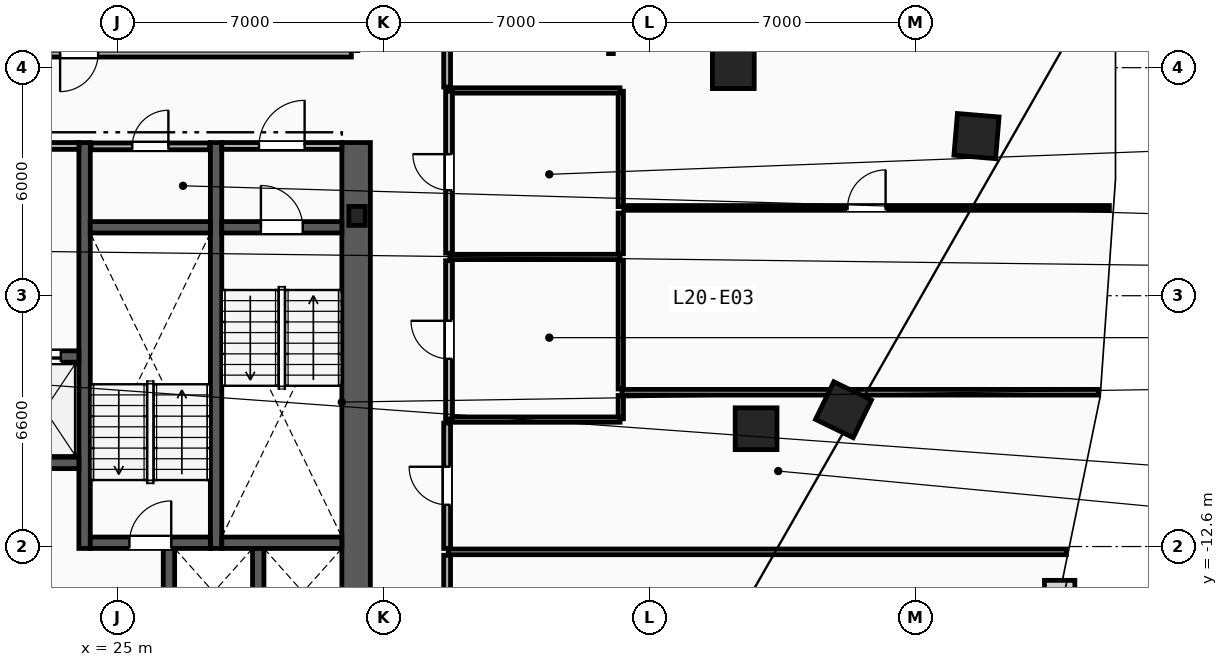
"""IFC4 building model, lengths in metres.
Left out: names, types, materials, properties, quantities, classifications, styles, units other than length and angle.
Written with IfcOpenShell. Run it as: python <this file> out.ifc"""

import sys

from ifc_helpers import new_model, si_unit, direction, frame, frame_2d, origin, origin_2d, place, context, subcontext, project, spatial, rectangle, i_section, extrude, element, fill, save


model = new_model("IFC4")
c1 = context("Model", 3, precision=1e-05, world=origin(), true_north=direction((0.0, 1.0)))
c2 = subcontext(c1, "Body", "Model", "MODEL_VIEW")
j1 = project(units=[si_unit("LENGTHUNIT", "METRE"), si_unit("PLANEANGLEUNIT", "RADIAN")], contexts=[c1])
p1 = place(None, origin())
s1 = spatial("IfcSite", under=j1, at=p1, CompositionType="ELEMENT")
p2 = place(p1, origin())
s2 = spatial("IfcBuilding", under=s1, at=p2, CompositionType="ELEMENT")
p3 = place(p2, frame((0.0, 0.0, 81.8)))
s3 = spatial("IfcBuildingStorey", under=s2, at=p3, CompositionType="ELEMENT", Elevation=81.8)
p4 = place(p3, frame((31.3, -3.9, 0.0), z_axis=(0.0, 0.0, 1.0), x_axis=(1.0, 0.0, 0.0)))
e1 = element("IfcColumn", 1, at=p4, inside=s3, PredefinedType="COLUMN", context=c2, shape_type="SweptSolid", body=[
    extrude(i_section(OverallWidth=0.432, OverallDepth=0.498, WebThickness=0.056, FlangeThickness=0.089, FilletRadius=0.018, at=origin_2d()), origin(), (0.0, 0.0, 1.0), 3.6),
])
for number, where, z_axis, x_axis in (
    (2, (41.2, 0.0, 0.0), (0.0, 0.0, 1.0), (1.0, 0.0, 0.0)),
    (3, (41.8, -9.5, 0.0), (0.0, 0.0, 1.0), (1.0, 0.0, 0.0)),
    (4, (44.1, -9.0, 0.0), (0.0, 0.0, 1.0), (0.437, 0.899, 0.0)),
    (5, (47.6, -1.8, 0.0), (0.0, 0.0, 1.0), (0.084, 0.997, 0.0)),
):
    element("IfcColumn", number, at=place(p3, frame(where, z_axis=z_axis, x_axis=x_axis)), inside=s3, PredefinedType="COLUMN", context=c2, shape_type="SweptSolid", body=[
        extrude(rectangle(XDim=1.1, YDim=1.1, at=origin_2d()), origin(), (0.0, 0.0, 1.0), 3.6),
    ])
p5 = place(p3, frame((31.275, -15.3, 0.0), z_axis=(0.0, 0.0, 1.0), x_axis=(0.0, 1.0, 0.0)))
e6 = element("IfcWall", 6, at=p5, inside=s3, PredefinedType="SHEAR", context=c2, shape_type="SweptSolid", body=[
    extrude(rectangle(XDim=13.33, YDim=0.75, at=frame_2d((6.665, 0.0))), origin(), (0.0, 0.0, 1.0), 3.3),
])
for number, where, z_axis, x_axis in (
    (7, (27.59, -12.65, 0.0), (0.0, 0.0, 1.0), (0.0, 1.0, 0.0)),
    (8, (24.13, -12.65, 0.0), (0.0, 0.0, 1.0), (0.0, 1.0, 0.0)),
):
    element("IfcWall", number, at=place(p3, frame(where, z_axis=z_axis, x_axis=x_axis)), inside=s3, PredefinedType="SHEAR", context=c2, shape_type="SweptSolid", body=[
        extrude(rectangle(XDim=10.68, YDim=0.3, at=frame_2d((5.34, 0.0))), origin(), (0.0, 0.0, 1.0), 3.3),
    ])
p6 = place(p3, frame((27.74, -4.2, 0.0), z_axis=(0.0, 0.0, 1.0), x_axis=(1.0, 0.0, 0.0)))
e9 = element("IfcWall", 9, at=p6, inside=s3, PredefinedType="SHEAR", context=c2, shape_type="SweptSolid", body=[
    extrude(rectangle(XDim=3.16, YDim=0.3, at=frame_2d((1.58, 0.0))), origin(), (0.0, 0.0, 1.0), 3.3),
])
p7 = place(p6, frame((1.03, 0.0, 0.0)))
e10 = element("IfcOpeningElement", 10, at=p7, cuts=e9, PredefinedType="OPENING", context=c2, shape_type="SweptSolid", body=[
    extrude(rectangle(XDim=1.1, YDim=2.15, at=frame_2d((0.55, 1.075))), frame((0.0, 0.16, 0.0), z_axis=(0.0, -1.0, 0.0), x_axis=(1.0, 0.0, 0.0)), (0.0, 0.0, 1.0), 0.32),
])
p8 = place(p3, frame((27.74, -12.5, 0.0), z_axis=(0.0, 0.0, 1.0), x_axis=(1.0, 0.0, 0.0)))
e11 = element("IfcWall", 11, at=p8, inside=s3, PredefinedType="SHEAR", context=c2, shape_type="SweptSolid", body=[
    extrude(rectangle(XDim=3.16, YDim=0.3, at=frame_2d((1.58, 0.0))), origin(), (0.0, 0.0, 1.0), 3.3),
])
p9 = place(p3, frame((24.28, -12.5, 0.0), z_axis=(0.0, 0.0, 1.0), x_axis=(1.0, 0.0, 0.0)))
e12 = element("IfcWall", 12, at=p9, inside=s3, PredefinedType="SHEAR", context=c2, shape_type="SweptSolid", body=[
    extrude(rectangle(XDim=3.16, YDim=0.3, at=frame_2d((1.58, 0.0))), origin(), (0.0, 0.0, 1.0), 3.3),
])
p10 = place(p9, frame((1.03, 0.0, 0.0)))
e13 = element("IfcOpeningElement", 13, at=p10, cuts=e12, PredefinedType="OPENING", context=c2, shape_type="SweptSolid", body=[
    extrude(rectangle(XDim=1.1, YDim=2.15, at=frame_2d((0.55, 1.075))), frame((0.0, 0.16, 0.0), z_axis=(0.0, -1.0, 0.0), x_axis=(1.0, 0.0, 0.0)), (0.0, 0.0, 1.0), 0.32),
])
p11 = place(p3, frame((24.28, -4.2, 0.0), z_axis=(0.0, 0.0, 1.0), x_axis=(1.0, 0.0, 0.0)))
e14 = element("IfcWall", 14, at=p11, inside=s3, PredefinedType="SHEAR", context=c2, shape_type="SweptSolid", body=[
    extrude(rectangle(XDim=3.16, YDim=0.3, at=frame_2d((1.58, 0.0))), origin(), (0.0, 0.0, 1.0), 3.3),
])
p12 = place(p3, frame((20.98, -2.06, 0.0), z_axis=(0.0, 0.0, 1.0), x_axis=(1.0, 0.0, 0.0)))
e15 = element("IfcWall", 15, at=p12, inside=s3, PredefinedType="PARTITIONING", context=c2, shape_type="SweptSolid", body=[
    extrude(rectangle(XDim=3.0, YDim=0.18, at=frame_2d((1.5, 0.0))), origin(), (0.0, 0.0, 1.0), 3.3),
])
p13 = place(p12, frame((0.9, 0.0, 0.0)))
e16 = element("IfcOpeningElement", 16, at=p13, cuts=e15, PredefinedType="OPENING", context=c2, shape_type="SweptSolid", body=[
    extrude(rectangle(XDim=1.2, YDim=2.15, at=frame_2d((0.6, 1.075))), frame((0.0, 0.1, 0.0), z_axis=(0.0, -1.0, 0.0), x_axis=(1.0, 0.0, 0.0)), (0.0, 0.0, 1.0), 0.2),
])
p14 = place(p3, frame((27.74, -2.06, 0.0), z_axis=(0.0, 0.0, 1.0), x_axis=(1.0, 0.0, 0.0)))
e17 = element("IfcWall", 17, at=p14, inside=s3, PredefinedType="PARTITIONING", context=c2, shape_type="SweptSolid", body=[
    extrude(rectangle(XDim=3.16, YDim=0.18, at=frame_2d((1.58, 0.0))), origin(), (0.0, 0.0, 1.0), 3.3),
])
p15 = place(p14, frame((0.98, 0.0, 0.0)))
e18 = element("IfcOpeningElement", 18, at=p15, cuts=e17, PredefinedType="OPENING", context=c2, shape_type="SweptSolid", body=[
    extrude(rectangle(XDim=1.2, YDim=2.15, at=frame_2d((0.6, 1.075))), frame((0.0, 0.1, 0.0), z_axis=(0.0, -1.0, 0.0), x_axis=(1.0, 0.0, 0.0)), (0.0, 0.0, 1.0), 0.2),
])
p16 = place(p3, frame((21.88, -7.6, 0.0), z_axis=(0.0, 0.0, 1.0), x_axis=(1.0, 0.0, 0.0)))
e19 = element("IfcWall", 19, at=p16, inside=s3, PredefinedType="SHEAR", context=c2, shape_type="SweptSolid", body=[
    extrude(rectangle(XDim=2.1, YDim=0.3, at=frame_2d((1.05, 0.0))), origin(), (0.0, 0.0, 1.0), 3.3),
])
p17 = place(p16, frame((0.475, 0.0, 0.0)))
e20 = element("IfcOpeningElement", 20, at=p17, cuts=e19, PredefinedType="OPENING", context=c2, shape_type="SweptSolid", body=[
    extrude(rectangle(XDim=1.15, YDim=2.2, at=frame_2d((0.575, 1.1))), frame((0.0, 0.16, 0.0), z_axis=(0.0, -1.0, 0.0), x_axis=(1.0, 0.0, 0.0)), (0.0, 0.0, 1.0), 0.32),
])
p18 = place(p3, frame((21.88, -10.4, 0.0), z_axis=(0.0, 0.0, 1.0), x_axis=(1.0, 0.0, 0.0)))
e21 = element("IfcWall", 21, at=p18, inside=s3, PredefinedType="SHEAR", context=c2, shape_type="SweptSolid", body=[
    extrude(rectangle(XDim=2.1, YDim=0.3, at=frame_2d((1.05, 0.0))), origin(), (0.0, 0.0, 1.0), 3.3),
])
for number, where, z_axis, x_axis in (
    (22, (28.7, -14.95, 0.0), (0.0, 0.0, 1.0), (0.0, 1.0, 0.0)),
    (23, (26.35, -14.95, 0.0), (0.0, 0.0, 1.0), (0.0, 1.0, 0.0)),
):
    element("IfcWall", number, at=place(p3, frame(where, z_axis=z_axis, x_axis=x_axis)), inside=s3, PredefinedType="SHEAR", context=c2, shape_type="SweptSolid", body=[
        extrude(rectangle(XDim=2.3, YDim=0.3, at=frame_2d((1.15, 0.0))), origin(), (0.0, 0.0, 1.0), 3.3),
    ])
p19 = place(p3, frame((24.3, -2.07, 0.0), z_axis=(0.0, 0.0, 1.0), x_axis=(1.0, 0.0, 0.0)))
e24 = element("IfcWall", 24, at=p19, inside=s3, PredefinedType="PARTITIONING", context=c2, shape_type="SweptSolid", body=[
    extrude(rectangle(XDim=3.12, YDim=0.18, at=frame_2d((1.56, 0.0))), origin(), (0.0, 0.0, 1.0), 3.3),
])
p20 = place(p19, frame((1.085, 0.0, 0.0)))
e25 = element("IfcOpeningElement", 25, at=p20, cuts=e24, PredefinedType="OPENING", context=c2, shape_type="SweptSolid", body=[
    extrude(rectangle(XDim=0.95, YDim=2.1, at=frame_2d((0.475, 1.05))), frame((0.0, 0.1, 0.0), z_axis=(0.0, -1.0, 0.0), x_axis=(1.0, 0.0, 0.0)), (0.0, 0.0, 1.0), 0.2),
])
p21 = place(p3, frame((38.24, -9.24, 0.0), z_axis=(0.0, 0.0, 1.0), x_axis=(0.0, 1.0, 0.0)))
e26 = element("IfcWall", 26, at=p21, inside=s3, PredefinedType="PARTITIONING", context=c2, shape_type="SweptSolid", body=[
    extrude(rectangle(XDim=0.615, YDim=0.14, at=frame_2d((0.308, 0.0))), origin(), (0.0, 0.0, 1.0), 3.3),
])
p22 = place(p3, frame((38.24, -8.455, 0.0), z_axis=(0.0, 0.0, 1.0), x_axis=(0.0, 1.0, 0.0)))
e27 = element("IfcWall", 27, at=p22, inside=s3, PredefinedType="PARTITIONING", context=c2, shape_type="SweptSolid", body=[
    extrude(rectangle(XDim=3.39, YDim=0.14, at=frame_2d((1.695, 0.0))), origin(), (0.0, 0.0, 1.0), 3.3),
])
p23 = place(p3, frame((38.24, -4.895, 0.0), z_axis=(0.0, 0.0, 1.0), x_axis=(0.0, 1.0, 0.0)))
e28 = element("IfcWall", 28, at=p23, inside=s3, PredefinedType="PARTITIONING", context=c2, shape_type="SweptSolid", body=[
    extrude(rectangle(XDim=1.07, YDim=0.14, at=frame_2d((0.535, 0.0))), origin(), (0.0, 0.0, 1.0), 3.3),
])
p24 = place(p3, frame((38.24, -3.655, 0.0), z_axis=(0.0, 0.0, 1.0), x_axis=(0.0, 1.0, 0.0)))
e29 = element("IfcWall", 29, at=p24, inside=s3, PredefinedType="PARTITIONING", context=c2, shape_type="SweptSolid", body=[
    extrude(rectangle(XDim=3.035, YDim=0.14, at=frame_2d((1.518, 0.0))), origin(), (0.0, 0.0, 1.0), 3.3),
])
for number, where, z_axis, x_axis in (
    (30, (33.74, -0.6, 0.0), (0.0, 0.0, 1.0), (1.0, 0.0, 0.0)),
    (31, (33.74, -4.98, 0.0), (0.0, 0.0, 1.0), (1.0, 0.0, 0.0)),
    (32, (33.74, -9.26, 0.0), (0.0, 0.0, 1.0), (1.0, 0.0, 0.0)),
):
    element("IfcWall", number, at=place(p3, frame(where, z_axis=z_axis, x_axis=x_axis)), inside=s3, PredefinedType="PARTITIONING", context=c2, shape_type="SweptSolid", body=[
        extrude(rectangle(XDim=4.48, YDim=0.14, at=frame_2d((2.24, 0.0))), origin(), (0.0, 0.0, 1.0), 3.3),
    ])
p25 = place(p3, frame((33.72, -4.88, 0.0), z_axis=(0.0, 0.0, 1.0), x_axis=(0.0, 1.0, 0.0)))
e33 = element("IfcWall", 33, at=p25, inside=s3, PredefinedType="PARTITIONING", context=c2, shape_type="SweptSolid", body=[
    extrude(rectangle(XDim=4.26, YDim=0.18, at=frame_2d((2.13, 0.0))), origin(), (0.0, 0.0, 1.0), 3.3),
])
p26 = place(p25, frame((1.655, 0.0, 0.0)))
e34 = element("IfcOpeningElement", 34, at=p26, cuts=e33, PredefinedType="OPENING", context=c2, shape_type="SweptSolid", body=[
    extrude(rectangle(XDim=0.95, YDim=2.1, at=frame_2d((0.475, 1.05))), frame((0.0, 0.1, 0.0), z_axis=(0.0, -1.0, 0.0), x_axis=(1.0, 0.0, 0.0)), (0.0, 0.0, 1.0), 0.2),
])
p27 = place(p3, frame((33.72, -9.24, 0.0), z_axis=(0.0, 0.0, 1.0), x_axis=(0.0, 1.0, 0.0)))
e35 = element("IfcWall", 35, at=p27, inside=s3, PredefinedType="PARTITIONING", context=c2, shape_type="SweptSolid", body=[
    extrude(rectangle(XDim=4.16, YDim=0.18, at=frame_2d((2.08, 0.0))), origin(), (0.0, 0.0, 1.0), 3.3),
])
p28 = place(p27, frame((1.58, 0.0, 0.0)))
e36 = element("IfcOpeningElement", 36, at=p28, cuts=e35, PredefinedType="OPENING", context=c2, shape_type="SweptSolid", body=[
    extrude(rectangle(XDim=1.0, YDim=2.15, at=frame_2d((0.5, 1.075))), frame((0.0, 0.1, 0.0), z_axis=(0.0, -1.0, 0.0), x_axis=(1.0, 0.0, 0.0)), (0.0, 0.0, 1.0), 0.2),
])
p29 = place(p3, frame((37.98, 0.37, 0.0), z_axis=(0.0, 0.0, 1.0), x_axis=(0.0, 1.0, 0.0)))
e37 = element("IfcWall", 37, at=p29, inside=s3, PredefinedType="PARTITIONING", context=c2, shape_type="SweptSolid", body=[
    extrude(rectangle(XDim=11.08, YDim=0.125, at=frame_2d((5.54, 0.0))), origin(), (0.0, 0.0, 1.0), 3.3),
])
p30 = place(p3, frame((38.27, -8.54, 0.0), z_axis=(0.0, 0.0, 1.0), x_axis=(1.0, 0.0, 0.0)))
e38 = element("IfcWall", 38, at=p30, inside=s3, PredefinedType="PARTITIONING", context=c2, shape_type="SweptSolid", body=[
    extrude(rectangle(XDim=12.543, YDim=0.15, at=frame_2d((6.271, 0.0))), origin(), (0.0, 0.0, 1.0), 3.3),
])
p31 = place(p3, frame((33.7, -12.74, 0.0), z_axis=(0.0, 0.0, 1.0), x_axis=(1.0, 0.0, 0.0)))
e39 = element("IfcWall", 39, at=p31, inside=s3, PredefinedType="PARTITIONING", context=c2, shape_type="SweptSolid", body=[
    extrude(rectangle(XDim=16.264, YDim=0.15, at=frame_2d((8.132, 0.0))), origin(), (0.0, 0.0, 1.0), 3.3),
])
p32 = place(p3, frame((33.67, -17.428, 0.0), z_axis=(0.0, 0.0, 1.0), x_axis=(0.0, 1.0, 0.0)))
e40 = element("IfcWall", 40, at=p32, inside=s3, PredefinedType="PARTITIONING", context=c2, shape_type="SweptSolid", body=[
    extrude(rectangle(XDim=4.598, YDim=0.18, at=frame_2d((2.299, 0.0))), origin(), (0.0, 0.0, 1.0), 3.3),
])
p33 = place(p32, frame((1.799, 0.0, 0.0)))
e41 = element("IfcOpeningElement", 41, at=p33, cuts=e40, PredefinedType="OPENING", context=c2, shape_type="SweptSolid", body=[
    extrude(rectangle(XDim=1.0, YDim=2.15, at=frame_2d((0.5, 1.075))), frame((0.0, 0.1, 0.0), z_axis=(0.0, -1.0, 0.0), x_axis=(1.0, 0.0, 0.0)), (0.0, 0.0, 1.0), 0.2),
])
p34 = place(p3, frame((33.67, -12.65, 0.0), z_axis=(0.0, 0.0, 1.0), x_axis=(0.0, 1.0, 0.0)))
e42 = element("IfcWall", 42, at=p34, inside=s3, PredefinedType="PARTITIONING", context=c2, shape_type="SweptSolid", body=[
    extrude(rectangle(XDim=3.299, YDim=0.18, at=frame_2d((1.649, 0.0))), origin(), (0.0, 0.0, 1.0), 3.3),
])
p35 = place(p34, frame((1.149, 0.0, 0.0)))
e43 = element("IfcOpeningElement", 43, at=p35, cuts=e42, PredefinedType="OPENING", context=c2, shape_type="SweptSolid", body=[
    extrude(rectangle(XDim=1.0, YDim=2.15, at=frame_2d((0.5, 1.075))), frame((0.0, 0.1, 0.0), z_axis=(0.0, -1.0, 0.0), x_axis=(1.0, 0.0, 0.0)), (0.0, 0.0, 1.0), 0.2),
])
p36 = place(p3, frame((31.15, 0.37, 0.0), z_axis=(0.0, 0.0, 1.0), x_axis=(-1.0, 0.0, 0.0)))
e44 = element("IfcWall", 44, at=p36, inside=s3, PredefinedType="PARTITIONING", context=c2, shape_type="SweptSolid", body=[
    extrude(rectangle(XDim=14.328, YDim=0.18, at=frame_2d((7.164, 0.0))), origin(), (0.0, 0.0, 1.0), 3.3),
])
p37 = place(p36, frame((6.664, 0.0, 0.0)))
e45 = element("IfcOpeningElement", 45, at=p37, cuts=e44, PredefinedType="OPENING", context=c2, shape_type="SweptSolid", body=[
    extrude(rectangle(XDim=1.0, YDim=2.15, at=frame_2d((0.5, 1.075))), frame((0.0, 0.1, 0.0), z_axis=(0.0, -1.0, 0.0), x_axis=(1.0, 0.0, 0.0)), (0.0, 0.0, 1.0), 0.2),
])
p38 = place(p3, frame((33.67, -0.509, 0.0), z_axis=(0.0, 0.0, 1.0), x_axis=(0.0, 1.0, 0.0)))
e46 = element("IfcWall", 46, at=p38, inside=s3, PredefinedType="PARTITIONING", context=c2, shape_type="SweptSolid", body=[
    extrude(rectangle(XDim=11.908, YDim=0.18, at=frame_2d((5.954, 0.0))), origin(), (0.0, 0.0, 1.0), 3.3),
])
p39 = place(p38, frame((5.454, 0.0, 0.0)))
e47 = element("IfcOpeningElement", 47, at=p39, cuts=e46, PredefinedType="OPENING", context=c2, shape_type="SweptSolid", body=[
    extrude(rectangle(XDim=1.0, YDim=2.15, at=frame_2d((0.5, 1.075))), frame((0.0, 0.1, 0.0), z_axis=(0.0, -1.0, 0.0), x_axis=(1.0, 0.0, 0.0)), (0.0, 0.0, 1.0), 0.2),
])
p40 = place(p3, frame((38.32, -3.69, 0.0), z_axis=(0.0, 0.0, 1.0), x_axis=(1.0, 0.0, 0.0)))
e48 = element("IfcWall", 48, at=p40, inside=s3, PredefinedType="PARTITIONING", context=c2, shape_type="SweptSolid", body=[
    extrude(rectangle(XDim=12.776, YDim=0.125, at=frame_2d((6.388, 0.0))), origin(), (0.0, 0.0, 1.0), 3.3),
])
p41 = place(p40, frame((5.888, 0.0, 0.0)))
e49 = element("IfcOpeningElement", 49, at=p41, cuts=e48, PredefinedType="OPENING", context=c2, shape_type="SweptSolid", body=[
    extrude(rectangle(XDim=1.0, YDim=2.15, at=frame_2d((0.5, 1.075))), frame((0.0, 0.073, 0.0), z_axis=(0.0, -1.0, 0.0), x_axis=(1.0, 0.0, 0.0)), (0.0, 0.0, 1.0), 0.145),
])
p42 = place(p7, origin())
e50 = element("IfcDoor", 50, at=p42, inside=s3, OperationType="SINGLE_SWING_LEFT", PredefinedType="DOOR", context=c2, shape_type="SweptSolid", body=[
    extrude(rectangle(XDim=1.1, YDim=2.15, at=frame_2d((0.55, 1.075))), frame((0.0, 0.025, 0.0), z_axis=(0.0, -1.0, 0.0), x_axis=(1.0, 0.0, 0.0)), (0.0, 0.0, 1.0), 0.05),
])
fill(e10, e50)
p43 = place(p10, origin())
e51 = element("IfcDoor", 51, at=p43, inside=s3, OperationType="SINGLE_SWING_RIGHT", PredefinedType="DOOR", context=c2, shape_type="SweptSolid", body=[
    extrude(rectangle(XDim=1.1, YDim=2.15, at=frame_2d((0.55, 1.075))), frame((0.0, 0.025, 0.0), z_axis=(0.0, -1.0, 0.0), x_axis=(1.0, 0.0, 0.0)), (0.0, 0.0, 1.0), 0.05),
])
fill(e13, e51)
p44 = place(p15, origin())
e52 = element("IfcDoor", 52, at=p44, inside=s3, OperationType="SINGLE_SWING_RIGHT", PredefinedType="DOOR", context=c2, shape_type="SweptSolid", body=[
    extrude(rectangle(XDim=1.2, YDim=2.15, at=frame_2d((0.6, 1.075))), frame((0.0, 0.025, 0.0), z_axis=(0.0, -1.0, 0.0), x_axis=(1.0, 0.0, 0.0)), (0.0, 0.0, 1.0), 0.05),
])
fill(e18, e52)
p45 = place(p17, origin())
e53 = element("IfcDoor", 53, at=p45, inside=s3, OperationType="SLIDING_TO_LEFT", PredefinedType="TRAPDOOR", context=c2, shape_type="SweptSolid", body=[
    extrude(rectangle(XDim=1.15, YDim=2.2, at=frame_2d((0.575, 1.1))), frame((0.0, 0.025, 0.0), z_axis=(0.0, -1.0, 0.0), x_axis=(1.0, 0.0, 0.0)), (0.0, 0.0, 1.0), 0.05),
])
fill(e20, e53)
p46 = place(p37, origin())
e54 = element("IfcDoor", 54, at=p46, inside=s3, OperationType="SINGLE_SWING_RIGHT", PredefinedType="DOOR", context=c2, shape_type="SweptSolid", body=[
    extrude(rectangle(XDim=1.0, YDim=2.15, at=frame_2d((0.5, 1.075))), frame((0.0, 0.025, 0.0), z_axis=(0.0, -1.0, 0.0), x_axis=(1.0, 0.0, 0.0)), (0.0, 0.0, 1.0), 0.05),
])
fill(e45, e54)
p47 = place(p41, origin())
e55 = element("IfcDoor", 55, at=p47, inside=s3, OperationType="SINGLE_SWING_RIGHT", PredefinedType="DOOR", context=c2, shape_type="SweptSolid", body=[
    extrude(rectangle(XDim=1.0, YDim=2.15, at=frame_2d((0.5, 1.075))), frame((0.0, 0.025, 0.0), z_axis=(0.0, -1.0, 0.0), x_axis=(1.0, 0.0, 0.0)), (0.0, 0.0, 1.0), 0.05),
])
fill(e49, e55)
p48 = place(p26, origin())
e56 = element("IfcDoor", 56, at=p48, inside=s3, OperationType="SINGLE_SWING_RIGHT", PredefinedType="DOOR", context=c2, shape_type="SweptSolid", body=[
    extrude(rectangle(XDim=0.95, YDim=2.1, at=frame_2d((0.475, 1.05))), frame((0.0, 0.025, 0.0), z_axis=(0.0, -1.0, 0.0), x_axis=(1.0, 0.0, 0.0)), (0.0, 0.0, 1.0), 0.05),
])
fill(e34, e56)
p49 = place(p28, origin())
e57 = element("IfcDoor", 57, at=p49, inside=s3, OperationType="SINGLE_SWING_RIGHT", PredefinedType="DOOR", context=c2, shape_type="SweptSolid", body=[
    extrude(rectangle(XDim=1.0, YDim=2.15, at=frame_2d((0.5, 1.075))), frame((0.0, 0.025, 0.0), z_axis=(0.0, -1.0, 0.0), x_axis=(1.0, 0.0, 0.0)), (0.0, 0.0, 1.0), 0.05),
])
fill(e36, e57)
p50 = place(p35, origin())
e58 = element("IfcDoor", 58, at=p50, inside=s3, OperationType="SINGLE_SWING_RIGHT", PredefinedType="DOOR", context=c2, shape_type="SweptSolid", body=[
    extrude(rectangle(XDim=1.0, YDim=2.15, at=frame_2d((0.5, 1.075))), frame((0.0, 0.025, 0.0), z_axis=(0.0, -1.0, 0.0), x_axis=(1.0, 0.0, 0.0)), (0.0, 0.0, 1.0), 0.05),
])
fill(e43, e58)
p51 = place(p20, origin())
e59 = element("IfcDoor", 59, at=p51, inside=s3, OperationType="SINGLE_SWING_RIGHT", PredefinedType="DOOR", context=c2, shape_type="SweptSolid", body=[
    extrude(rectangle(XDim=0.95, YDim=2.1, at=frame_2d((0.475, 1.05))), frame((0.0, 0.025, 0.0), z_axis=(0.0, -1.0, 0.0), x_axis=(1.0, 0.0, 0.0)), (0.0, 0.0, 1.0), 0.05),
])
fill(e25, e59)
save(model, sys.argv[1])
